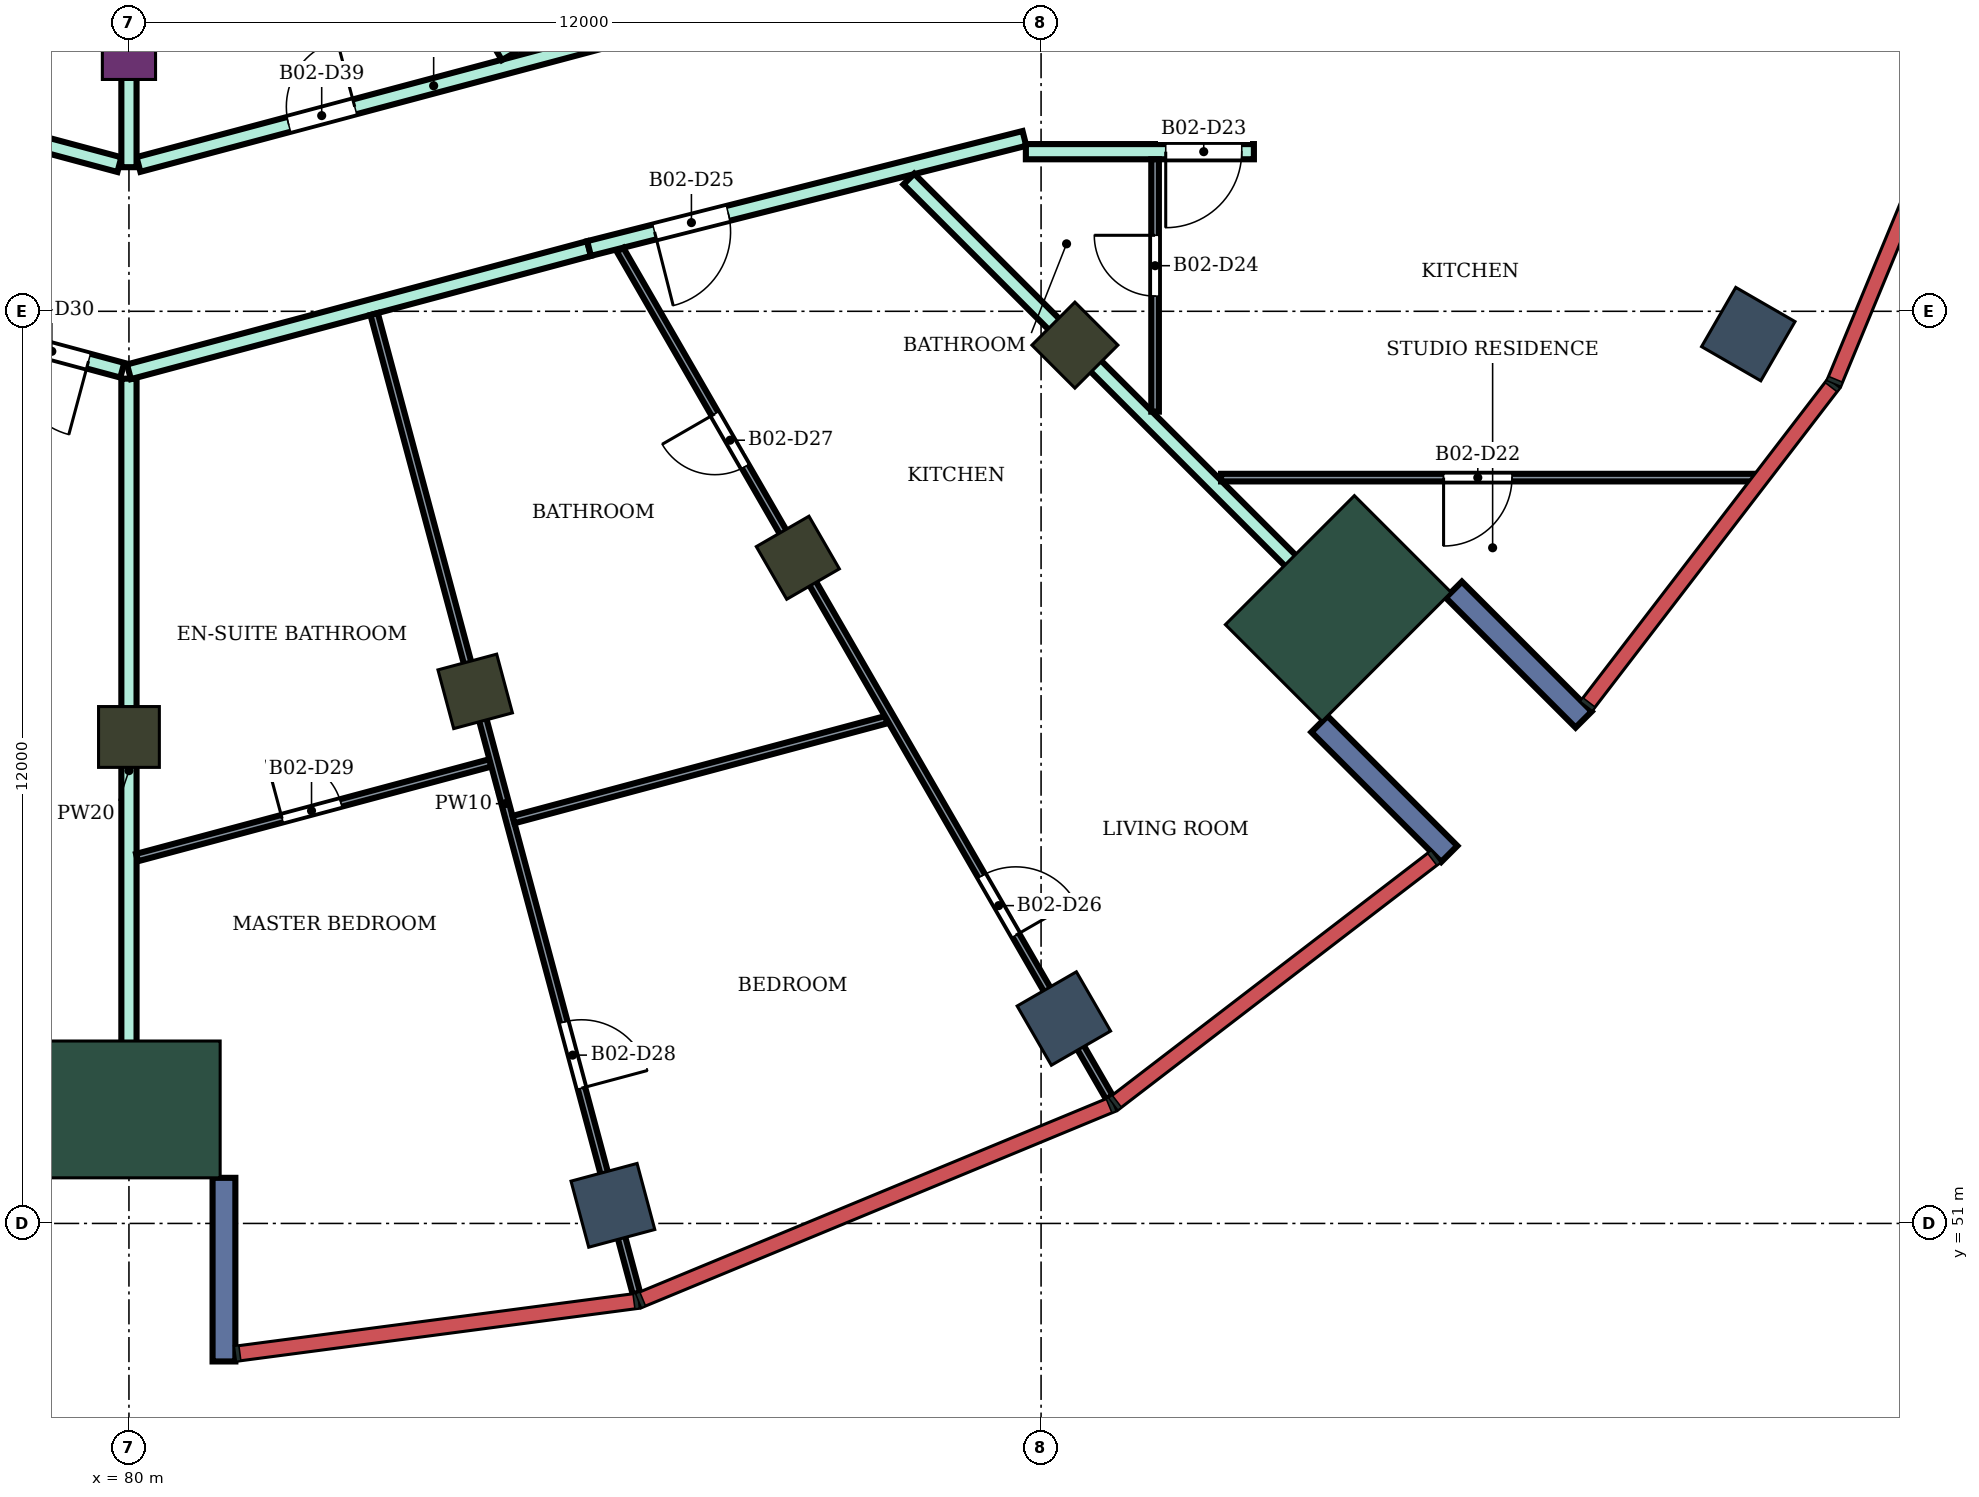
"""IFC4 building model, lengths in metres.
Left out: names, types, materials, properties, quantities, classifications, styles, units other than length and angle.
Written with IfcOpenShell. Run it as: python <this file> out.ifc"""

import sys

from ifc_helpers import new_model, si_unit, direction, frame, frame_2d, origin, origin_2d, place, context, subcontext, project, spatial, rectangle, extrude, element, fill, save


model = new_model("IFC4")
c1 = context("Model", 3, precision=1e-05, world=origin(), true_north=direction((0.0, 1.0)))
c2 = subcontext(c1, "Body", "Model", "MODEL_VIEW")
j1 = project(units=[si_unit("LENGTHUNIT", "METRE"), si_unit("PLANEANGLEUNIT", "RADIAN")], contexts=[c1])
p1 = place(None, origin())
s1 = spatial("IfcSite", under=j1, at=p1, CompositionType="ELEMENT")
p2 = place(p1, origin())
s2 = spatial("IfcBuilding", under=s1, at=p2, CompositionType="ELEMENT")
p3 = place(p2, frame((0.0, 0.0, 225.1)))
s3 = spatial("IfcBuildingStorey", under=s2, at=p3, CompositionType="ELEMENT", Elevation=225.1)
for number, where, z_axis, x_axis in (
    (1, (86.367, 51.238, 0.0), (0.0, 0.0, 1.0), (0.259, -0.966, 0.0)),
    (2, (92.3, 53.696, 0.0), (0.0, 0.0, 1.0), (0.5, -0.866, 0.0)),
    (3, (101.304, 62.7, 0.0), (0.0, 0.0, 1.0), (0.866, -0.5, 0.0)),
):
    element("IfcColumn", number, at=place(p3, frame(where, z_axis=z_axis, x_axis=x_axis)), inside=s3, PredefinedType="COLUMN", context=c2, shape_type="SweptSolid", body=[
        extrude(rectangle(XDim=0.9, YDim=0.9, at=origin_2d()), origin(), (0.0, 0.0, 1.0), 4.2),
    ])
for number, where, z_axis, x_axis in (
    (4, (80.0, 57.4, 0.0), (0.0, 0.0, 1.0), (0.0, -1.0, 0.0)),
    (5, (84.555, 58.0, 0.0), (0.0, 0.0, 1.0), (0.259, -0.966, 0.0)),
    (6, (88.8, 59.758, 0.0), (0.0, 0.0, 1.0), (0.5, -0.866, 0.0)),
    (7, (92.445, 62.555, 0.0), (0.0, 0.0, 1.0), (0.707, -0.707, 0.0)),
):
    element("IfcColumn", number, at=place(p3, frame(where, z_axis=z_axis, x_axis=x_axis)), inside=s3, PredefinedType="COLUMN", context=c2, shape_type="SweptSolid", body=[
        extrude(rectangle(XDim=0.8, YDim=0.8, at=origin_2d()), origin(), (0.0, 0.0, 1.0), 4.2),
    ])
p4 = place(p3, frame((80.0, 66.4, 0.0), z_axis=(0.0, 0.0, 1.0), x_axis=(0.0, -1.0, 0.0)))
e8 = element("IfcColumn", 8, at=p4, inside=s3, PredefinedType="COLUMN", context=c2, shape_type="SweptSolid", body=[
    extrude(rectangle(XDim=0.7, YDim=0.7, at=origin_2d()), origin(), (0.0, 0.0, 1.0), 4.2),
])
for number, where, z_axis, x_axis in (
    (9, (80.0, 52.5, 0.0), (0.0, 0.0, 1.0), (0.0, -1.0, 0.0)),
    (10, (95.91, 59.09, 0.0), (0.0, 0.0, 1.0), (0.707, -0.707, 0.0)),
):
    element("IfcColumn", number, at=place(p3, frame(where, z_axis=z_axis, x_axis=x_axis)), inside=s3, PredefinedType="COLUMN", context=c2, shape_type="SweptSolid", body=[
        extrude(rectangle(XDim=1.8, YDim=2.4, at=origin_2d()), origin(), (0.0, 0.0, 1.0), 4.2),
    ])
for number, where, z_axis, x_axis in (
    (11, (81.25, 51.6, 0.0), (0.0, 0.0, 1.0), (0.0, -1.0, 0.0)),
    (12, (95.662, 57.57, 0.0), (0.0, 0.0, 1.0), (0.707, -0.707, 0.0)),
    (13, (97.43, 59.338, 0.0), (0.0, 0.0, 1.0), (0.707, -0.707, 0.0)),
):
    element("IfcWall", number, at=place(p3, frame(where, z_axis=z_axis, x_axis=x_axis)), inside=s3, PredefinedType="NOTDEFINED", context=c2, shape_type="SweptSolid", body=[
        extrude(rectangle(XDim=2.416, YDim=0.3, at=frame_2d((1.208, 0.0))), origin(), (0.0, 0.0, 1.0), 4.2),
    ])
p5 = place(p3, frame((74.15, 63.772, 0.0), z_axis=(0.0, 0.0, 1.0), x_axis=(0.965807109237, -0.259261697417, 0.0)))
e14 = element("IfcWall", 14, at=p5, inside=s3, PredefinedType="PARTITIONING", context=c2, shape_type="SweptSolid", body=[
    extrude(rectangle(XDim=5.967, YDim=0.2, at=frame_2d((2.983, 0.0))), origin(), (0.0, 0.0, 1.0), 3.75),
])
p6 = place(p5, frame((4.507, 0.0, 0.0)))
e15 = element("IfcOpeningElement", 15, at=p6, cuts=e14, PredefinedType="OPENING", context=c2, shape_type="SweptSolid", body=[
    extrude(rectangle(XDim=1.0, YDim=2.1, at=frame_2d((0.5, 1.05))), frame((0.0, 0.11, 0.0), z_axis=(0.0, -1.0, 0.0), x_axis=(1.0, 0.0, 0.0)), (0.0, 0.0, 1.0), 0.22),
])
p7 = place(p3, frame((74.603, 66.342, 0.0), z_axis=(0.0, 0.0, 1.0), x_axis=(0.965920893652, -0.258837453254, 0.0)))
e16 = element("IfcWall", 16, at=p7, inside=s3, PredefinedType="PARTITIONING", context=c2, shape_type="SweptSolid", body=[
    extrude(rectangle(XDim=5.458, YDim=0.2, at=frame_2d((2.729, 0.0))), origin(), (0.0, 0.0, 1.0), 3.75),
])
p8 = place(p7, frame((2.512, 0.0, 0.0)))
e17 = element("IfcOpeningElement", 17, at=p8, cuts=e16, PredefinedType="OPENING", context=c2, shape_type="SweptSolid", body=[
    extrude(rectangle(XDim=0.9, YDim=2.1, at=frame_2d((0.45, 1.05))), frame((0.0, 0.11, 0.0), z_axis=(0.0, -1.0, 0.0), x_axis=(1.0, 0.0, 0.0)), (0.0, 0.0, 1.0), 0.22),
])
p9 = place(p3, frame((80.125, 64.932, 0.0), z_axis=(0.0, 0.0, 1.0), x_axis=(0.966236955806, 0.257655089674, 0.0)))
e18 = element("IfcWall", 18, at=p9, inside=s3, PredefinedType="PARTITIONING", context=c2, shape_type="SweptSolid", body=[
    extrude(rectangle(XDim=8.039, YDim=0.2, at=frame_2d((4.02, 0.0))), origin(), (0.0, 0.0, 1.0), 3.75),
])
p10 = place(p9, frame((6.298, 0.0, 0.0)))
e19 = element("IfcOpeningElement", 19, at=p10, cuts=e18, PredefinedType="OPENING", context=c2, shape_type="SweptSolid", body=[
    extrude(rectangle(XDim=0.9, YDim=2.1, at=frame_2d((0.45, 1.05))), frame((0.0, 0.11, 0.0), z_axis=(0.0, -1.0, 0.0), x_axis=(1.0, 0.0, 0.0)), (0.0, 0.0, 1.0), 0.22),
])
p11 = place(p9, frame((2.045, 0.0, 0.0)))
e20 = element("IfcOpeningElement", 20, at=p11, cuts=e18, PredefinedType="OPENING", context=c2, shape_type="SweptSolid", body=[
    extrude(rectangle(XDim=0.9, YDim=2.1, at=frame_2d((0.45, 1.05))), frame((0.0, 0.11, 0.0), z_axis=(0.0, -1.0, 0.0), x_axis=(1.0, 0.0, 0.0)), (0.0, 0.0, 1.0), 0.22),
])
p12 = place(p3, frame((80.0, 51.8, 0.0), z_axis=(0.0, 0.0, 1.0), x_axis=(0.0, 1.0, 0.0)))
e21 = element("IfcWall", 21, at=p12, inside=s3, PredefinedType="PARTITIONING", context=c2, shape_type="SweptSolid", body=[
    extrude(rectangle(XDim=10.314, YDim=0.2, at=frame_2d((5.157, 0.0))), origin(), (0.0, 0.0, 1.0), 3.75),
])
p13 = place(p3, frame((80.0, 62.204, 0.0), z_axis=(0.0, 0.0, 1.0), x_axis=(0.965938139786, 0.258773086132, 0.0)))
e22 = element("IfcWall", 22, at=p13, inside=s3, PredefinedType="PARTITIONING", context=c2, shape_type="SweptSolid", body=[
    extrude(rectangle(XDim=6.266, YDim=0.2, at=frame_2d((3.133, 0.0))), origin(), (0.0, 0.0, 1.0), 3.75),
])
p14 = place(p3, frame((80.0, 64.896, 0.0), z_axis=(0.0, 0.0, 1.0), x_axis=(0.0, 1.0, 0.0)))
e23 = element("IfcWall", 23, at=p14, inside=s3, PredefinedType="PARTITIONING", context=c2, shape_type="SweptSolid", body=[
    extrude(rectangle(XDim=2.405, YDim=0.2, at=frame_2d((1.203, 0.0))), origin(), (0.0, 0.0, 1.0), 3.75),
])
p15 = place(p3, frame((83.85, 68.333, 0.0), z_axis=(0.0, 0.0, 1.0), x_axis=(0.500080019051, -0.865979199835, 0.0)))
e24 = element("IfcWall", 24, at=p15, inside=s3, PredefinedType="PARTITIONING", context=c2, shape_type="SweptSolid", body=[
    extrude(rectangle(XDim=2.285, YDim=0.2, at=frame_2d((1.143, 0.0))), origin(), (0.0, 0.0, 1.0), 3.75),
])
p16 = place(p3, frame((86.053, 63.826, 0.0), z_axis=(0.0, 0.0, 1.0), x_axis=(0.969490004987, 0.245130843083, 0.0)))
e25 = element("IfcWall", 25, at=p16, inside=s3, PredefinedType="PARTITIONING", context=c2, shape_type="SweptSolid", body=[
    extrude(rectangle(XDim=5.908, YDim=0.2, at=frame_2d((2.954, 0.0))), origin(), (0.0, 0.0, 1.0), 3.75),
])
p17 = place(p16, frame((0.889, 0.0, 0.0)))
e26 = element("IfcOpeningElement", 26, at=p17, cuts=e25, PredefinedType="OPENING", context=c2, shape_type="SweptSolid", body=[
    extrude(rectangle(XDim=1.0, YDim=2.1, at=frame_2d((0.5, 1.05))), frame((0.0, 0.11, 0.0), z_axis=(0.0, -1.0, 0.0), x_axis=(1.0, 0.0, 0.0)), (0.0, 0.0, 1.0), 0.22),
])
p18 = place(p3, frame((90.26, 64.74, 0.0), z_axis=(0.0, 0.0, 1.0), x_axis=(0.707106781187, -0.707106781187, 0.0)))
e27 = element("IfcWall", 27, at=p18, inside=s3, PredefinedType="PARTITIONING", context=c2, shape_type="SweptSolid", body=[
    extrude(rectangle(XDim=8.69, YDim=0.2, at=frame_2d((4.345, 0.0))), origin(), (0.0, 0.0, 1.0), 3.75),
])
p19 = place(p3, frame((91.8, 65.1, 0.0), z_axis=(0.0, 0.0, 1.0), x_axis=(1.0, 0.0, 0.0)))
e28 = element("IfcWall", 28, at=p19, inside=s3, PredefinedType="PARTITIONING", context=c2, shape_type="SweptSolid", body=[
    extrude(rectangle(XDim=3.0, YDim=0.2, at=frame_2d((1.5, 0.0))), origin(), (0.0, 0.0, 1.0), 3.75),
])
p20 = place(p19, frame((1.84, 0.0, 0.0)))
e29 = element("IfcOpeningElement", 29, at=p20, cuts=e28, PredefinedType="OPENING", context=c2, shape_type="SweptSolid", body=[
    extrude(rectangle(XDim=1.0, YDim=2.1, at=frame_2d((0.5, 1.05))), frame((0.0, 0.11, 0.0), z_axis=(0.0, -1.0, 0.0), x_axis=(1.0, 0.0, 0.0)), (0.0, 0.0, 1.0), 0.22),
])
p21 = place(p3, frame((80.106, 55.813, 0.0), z_axis=(0.0, 0.0, 1.0), x_axis=(0.965936279421, 0.25878003033, 0.0)))
e30 = element("IfcWall", 30, at=p21, inside=s3, PredefinedType="PARTITIONING", context=c2, shape_type="SweptSolid", body=[
    extrude(rectangle(XDim=4.813, YDim=0.1, at=frame_2d((2.407, 0.0))), origin(), (0.0, 0.0, 1.0), 3.75),
])
p22 = place(p21, frame((1.977, 0.0, 0.0)))
e31 = element("IfcOpeningElement", 31, at=p22, cuts=e30, PredefinedType="OPENING", context=c2, shape_type="SweptSolid", body=[
    extrude(rectangle(XDim=0.8, YDim=2.1, at=frame_2d((0.4, 1.05))), frame((0.0, 0.06, 0.0), z_axis=(0.0, -1.0, 0.0), x_axis=(1.0, 0.0, 0.0)), (0.0, 0.0, 1.0), 0.12),
])
p23 = place(p3, frame((83.225, 62.965, 0.0), z_axis=(0.0, 0.0, 1.0), x_axis=(0.258742489642, -0.965946336012, 0.0)))
e32 = element("IfcWall", 32, at=p23, inside=s3, PredefinedType="PARTITIONING", context=c2, shape_type="SweptSolid", body=[
    extrude(rectangle(XDim=13.338, YDim=0.1, at=frame_2d((6.669, 0.0))), origin(), (0.0, 0.0, 1.0), 3.75),
])
p24 = place(p23, frame((9.644, 0.0, 0.0)))
e33 = element("IfcOpeningElement", 33, at=p24, cuts=e32, PredefinedType="OPENING", context=c2, shape_type="SweptSolid", body=[
    extrude(rectangle(XDim=0.9, YDim=2.1, at=frame_2d((0.45, 1.05))), frame((0.0, 0.06, 0.0), z_axis=(0.0, -1.0, 0.0), x_axis=(1.0, 0.0, 0.0)), (0.0, 0.0, 1.0), 0.12),
])
p25 = place(p3, frame((85.059, 56.313, 0.0), z_axis=(0.0, 0.0, 1.0), x_axis=(0.965911776939, 0.2588714723, 0.0)))
e34 = element("IfcWall", 34, at=p25, inside=s3, PredefinedType="PARTITIONING", context=c2, shape_type="SweptSolid", body=[
    extrude(rectangle(XDim=5.078, YDim=0.1, at=frame_2d((2.539, 0.0))), origin(), (0.0, 0.0, 1.0), 3.75),
])
p26 = place(p3, frame((86.461, 63.81, 0.0), z_axis=(0.0, 0.0, 1.0), x_axis=(0.499925973464, -0.866068138806, 0.0)))
e35 = element("IfcWall", 35, at=p26, inside=s3, PredefinedType="PARTITIONING", context=c2, shape_type="SweptSolid", body=[
    extrude(rectangle(XDim=12.876, YDim=0.1, at=frame_2d((6.438, 0.0))), origin(), (0.0, 0.0, 1.0), 3.75),
])
p27 = place(p26, frame((9.514, 0.0, 0.0)))
e36 = element("IfcOpeningElement", 36, at=p27, cuts=e35, PredefinedType="OPENING", context=c2, shape_type="SweptSolid", body=[
    extrude(rectangle(XDim=0.9, YDim=2.1, at=frame_2d((0.45, 1.05))), frame((0.0, 0.06, 0.0), z_axis=(0.0, -1.0, 0.0), x_axis=(1.0, 0.0, 0.0)), (0.0, 0.0, 1.0), 0.12),
])
p28 = place(p26, frame((2.494, 0.0, 0.0)))
e37 = element("IfcOpeningElement", 37, at=p28, cuts=e35, PredefinedType="OPENING", context=c2, shape_type="SweptSolid", body=[
    extrude(rectangle(XDim=0.8, YDim=2.1, at=frame_2d((0.4, 1.05))), frame((0.0, 0.06, 0.0), z_axis=(0.0, -1.0, 0.0), x_axis=(1.0, 0.0, 0.0)), (0.0, 0.0, 1.0), 0.12),
])
p29 = place(p3, frame((93.5, 61.68, 0.0), z_axis=(0.0, 0.0, 1.0), x_axis=(0.0, 1.0, 0.0)))
e38 = element("IfcWall", 38, at=p29, inside=s3, PredefinedType="PARTITIONING", context=c2, shape_type="SweptSolid", body=[
    extrude(rectangle(XDim=3.32, YDim=0.1, at=frame_2d((1.66, 0.0))), origin(), (0.0, 0.0, 1.0), 3.75),
])
p30 = place(p29, frame((1.52, 0.0, 0.0)))
e39 = element("IfcOpeningElement", 39, at=p30, cuts=e38, PredefinedType="OPENING", context=c2, shape_type="SweptSolid", body=[
    extrude(rectangle(XDim=0.8, YDim=2.1, at=frame_2d((0.4, 1.05))), frame((0.0, 0.06, 0.0), z_axis=(0.0, -1.0, 0.0), x_axis=(1.0, 0.0, 0.0)), (0.0, 0.0, 1.0), 0.12),
])
p31 = place(p3, frame((94.368, 60.812, 0.0), z_axis=(0.0, 0.0, 1.0), x_axis=(1.0, 0.0, 0.0)))
e40 = element("IfcWall", 40, at=p31, inside=s3, PredefinedType="PARTITIONING", context=c2, shape_type="SweptSolid", body=[
    extrude(rectangle(XDim=7.032, YDim=0.1, at=frame_2d((3.516, 0.0))), origin(), (0.0, 0.0, 1.0), 3.75),
])
p32 = place(p31, frame((2.927, 0.0, 0.0)))
e41 = element("IfcOpeningElement", 41, at=p32, cuts=e40, PredefinedType="OPENING", context=c2, shape_type="SweptSolid", body=[
    extrude(rectangle(XDim=0.9, YDim=2.1, at=frame_2d((0.45, 1.05))), frame((0.0, 0.06, 0.0), z_axis=(0.0, -1.0, 0.0), x_axis=(1.0, 0.0, 0.0)), (0.0, 0.0, 1.0), 0.12),
])
p33 = place(p32, frame((0.9, 0.0, 0.0), z_axis=(0.0, 0.0, 1.0), x_axis=(-1.0, 0.0, 0.0)))
e42 = element("IfcDoor", 42, at=p33, inside=s3, OperationType="SINGLE_SWING_RIGHT", PredefinedType="DOOR", context=c2, shape_type="SweptSolid", body=[
    extrude(rectangle(XDim=0.9, YDim=2.1, at=frame_2d((0.45, 1.05))), frame((0.0, 0.025, 0.0), z_axis=(0.0, -1.0, 0.0), x_axis=(1.0, 0.0, 0.0)), (0.0, 0.0, 1.0), 0.05),
])
fill(e41, e42)
p34 = place(p20, frame((1.0, 0.0, 0.0), z_axis=(0.0, 0.0, 1.0), x_axis=(-1.0, 0.0, 0.0)))
e43 = element("IfcDoor", 43, at=p34, inside=s3, OperationType="SINGLE_SWING_RIGHT", PredefinedType="DOOR", context=c2, shape_type="SweptSolid", body=[
    extrude(rectangle(XDim=1.0, YDim=2.1, at=frame_2d((0.5, 1.05))), frame((0.0, 0.025, 0.0), z_axis=(0.0, -1.0, 0.0), x_axis=(1.0, 0.0, 0.0)), (0.0, 0.0, 1.0), 0.05),
])
fill(e29, e43)
p35 = place(p30, origin())
e44 = element("IfcDoor", 44, at=p35, inside=s3, OperationType="SINGLE_SWING_RIGHT", PredefinedType="DOOR", context=c2, shape_type="SweptSolid", body=[
    extrude(rectangle(XDim=0.8, YDim=2.1, at=frame_2d((0.4, 1.05))), frame((0.0, 0.025, 0.0), z_axis=(0.0, -1.0, 0.0), x_axis=(1.0, 0.0, 0.0)), (0.0, 0.0, 1.0), 0.05),
])
fill(e39, e44)
p36 = place(p17, frame((1.0, 0.0, 0.0), z_axis=(0.0, 0.0, 1.0), x_axis=(-1.0, 0.0, 0.0)))
e45 = element("IfcDoor", 45, at=p36, inside=s3, OperationType="SINGLE_SWING_RIGHT", PredefinedType="DOOR", context=c2, shape_type="SweptSolid", body=[
    extrude(rectangle(XDim=1.0, YDim=2.1, at=frame_2d((0.5, 1.05))), frame((0.0, 0.025, 0.0), z_axis=(0.0, -1.0, 0.0), x_axis=(1.0, 0.0, 0.0)), (0.0, 0.0, 1.0), 0.05),
])
fill(e26, e45)
p37 = place(p27, origin())
e46 = element("IfcDoor", 46, at=p37, inside=s3, OperationType="SINGLE_SWING_RIGHT", PredefinedType="DOOR", context=c2, shape_type="SweptSolid", body=[
    extrude(rectangle(XDim=0.9, YDim=2.1, at=frame_2d((0.45, 1.05))), frame((0.0, 0.025, 0.0), z_axis=(0.0, -1.0, 0.0), x_axis=(1.0, 0.0, 0.0)), (0.0, 0.0, 1.0), 0.05),
])
fill(e36, e46)
p38 = place(p28, frame((0.8, 0.0, 0.0), z_axis=(0.0, 0.0, 1.0), x_axis=(-1.0, 0.0, 0.0)))
e47 = element("IfcDoor", 47, at=p38, inside=s3, OperationType="SINGLE_SWING_RIGHT", PredefinedType="DOOR", context=c2, shape_type="SweptSolid", body=[
    extrude(rectangle(XDim=0.8, YDim=2.1, at=frame_2d((0.4, 1.05))), frame((0.0, 0.025, 0.0), z_axis=(0.0, -1.0, 0.0), x_axis=(1.0, 0.0, 0.0)), (0.0, 0.0, 1.0), 0.05),
])
fill(e37, e47)
p39 = place(p24, origin())
e48 = element("IfcDoor", 48, at=p39, inside=s3, OperationType="SINGLE_SWING_RIGHT", PredefinedType="DOOR", context=c2, shape_type="SweptSolid", body=[
    extrude(rectangle(XDim=0.9, YDim=2.1, at=frame_2d((0.45, 1.05))), frame((0.0, 0.025, 0.0), z_axis=(0.0, -1.0, 0.0), x_axis=(1.0, 0.0, 0.0)), (0.0, 0.0, 1.0), 0.05),
])
fill(e33, e48)
p40 = place(p22, origin())
e49 = element("IfcDoor", 49, at=p40, inside=s3, OperationType="SINGLE_SWING_LEFT", PredefinedType="DOOR", context=c2, shape_type="SweptSolid", body=[
    extrude(rectangle(XDim=0.8, YDim=2.1, at=frame_2d((0.4, 1.05))), frame((0.0, 0.025, 0.0), z_axis=(0.0, -1.0, 0.0), x_axis=(1.0, 0.0, 0.0)), (0.0, 0.0, 1.0), 0.05),
])
fill(e31, e49)
p41 = place(p6, frame((1.0, 0.0, 0.0), z_axis=(0.0, 0.0, 1.0), x_axis=(-1.0, 0.0, 0.0)))
e50 = element("IfcDoor", 50, at=p41, inside=s3, OperationType="SINGLE_SWING_LEFT", PredefinedType="DOOR", context=c2, shape_type="SweptSolid", body=[
    extrude(rectangle(XDim=1.0, YDim=2.1, at=frame_2d((0.5, 1.05))), frame((0.0, 0.025, 0.0), z_axis=(0.0, -1.0, 0.0), x_axis=(1.0, 0.0, 0.0)), (0.0, 0.0, 1.0), 0.05),
])
fill(e15, e50)
p42 = place(p11, origin())
e51 = element("IfcDoor", 51, at=p42, inside=s3, OperationType="SINGLE_SWING_RIGHT", PredefinedType="DOOR", context=c2, shape_type="SweptSolid", body=[
    extrude(rectangle(XDim=0.9, YDim=2.1, at=frame_2d((0.45, 1.05))), frame((0.0, 0.025, 0.0), z_axis=(0.0, -1.0, 0.0), x_axis=(1.0, 0.0, 0.0)), (0.0, 0.0, 1.0), 0.05),
])
fill(e20, e51)
save(model, sys.argv[1])
